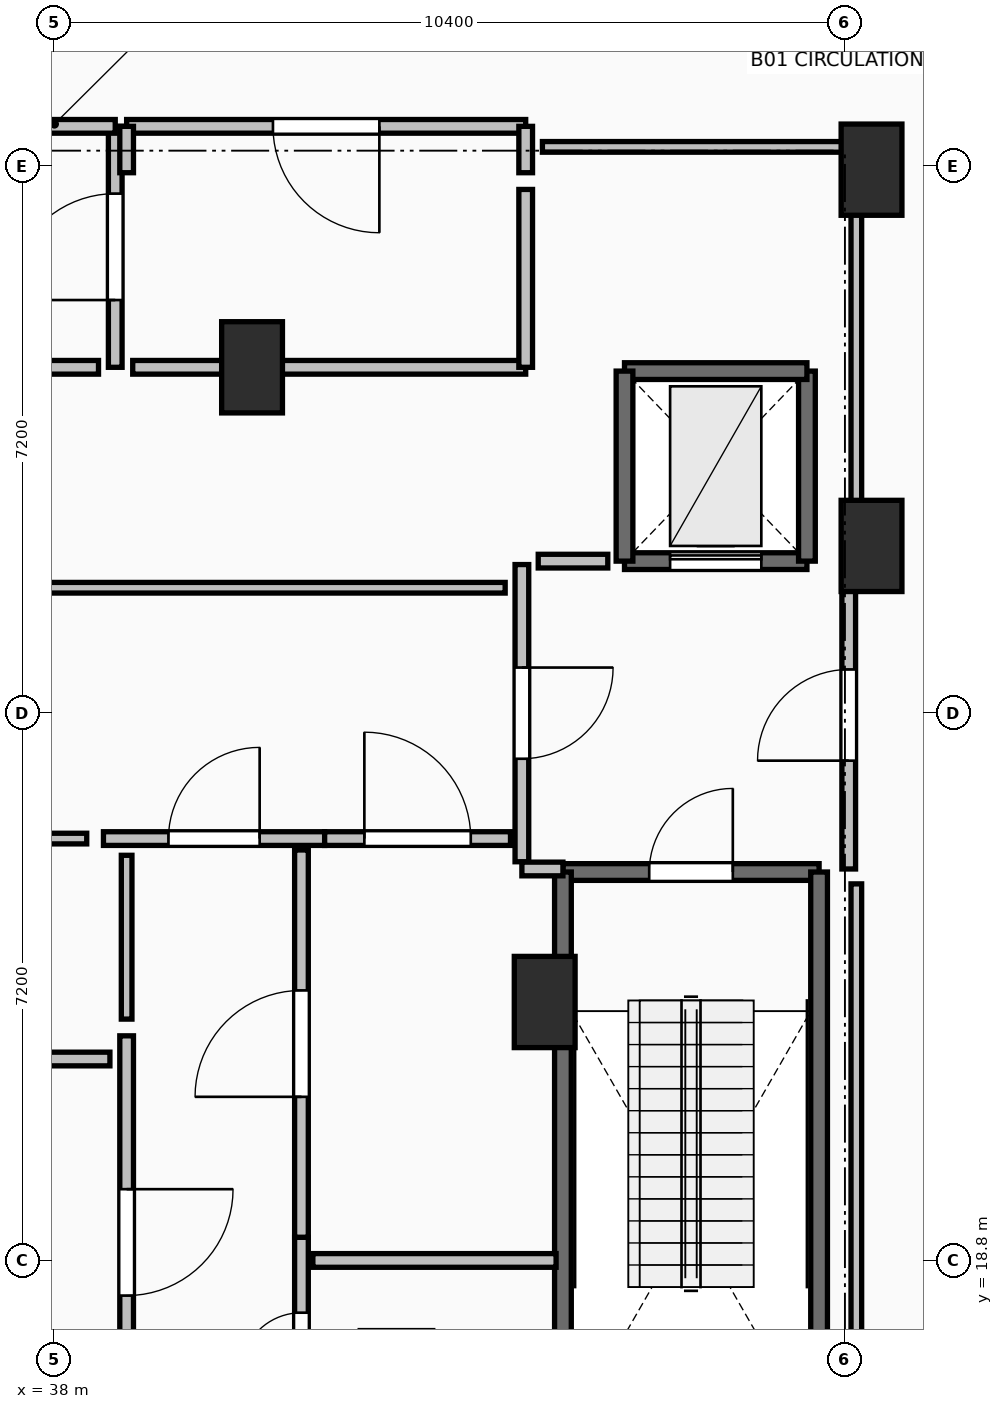
"""IFC4 building model, lengths in metres.
Left out: names, types, materials, properties, quantities, classifications, styles, units other than length and angle.
Written with IfcOpenShell. Run it as: python <this file> out.ifc"""

import sys

from ifc_helpers import new_model, si_unit, direction, frame, frame_2d, origin, origin_2d, place, context, subcontext, project, spatial, rectangle, extrude, element, fill, save


model = new_model("IFC4")
c1 = context("Model", 3, precision=1e-05, world=origin(), true_north=direction((0.0, 1.0)))
c2 = subcontext(c1, "Body", "Model", "MODEL_VIEW")
j1 = project(units=[si_unit("LENGTHUNIT", "METRE"), si_unit("PLANEANGLEUNIT", "RADIAN")], contexts=[c1])
p1 = place(None, origin())
s1 = spatial("IfcSite", under=j1, at=p1, CompositionType="ELEMENT")
p2 = place(p1, origin())
s2 = spatial("IfcBuilding", under=s1, at=p2, CompositionType="ELEMENT")
p3 = place(p2, frame((0.0, 0.0, -4.8)))
s3 = spatial("IfcBuildingStorey", under=s2, at=p3, CompositionType="ELEMENT", Elevation=-4.8)
for number, where, z_axis, x_axis in (
    (1, (48.75, 33.15, 0.0), (0.0, 0.0, 1.0), (1.0, 0.0, 0.0)),
    (2, (48.75, 28.2, 0.0), (0.0, 0.0, 1.0), (1.0, 0.0, 0.0)),
    (3, (44.45, 22.2, 0.0), (0.0, 0.0, 1.0), (1.0, 0.0, 0.0)),
    (4, (40.6, 30.55, 0.0), (0.0, 0.0, 1.0), (1.0, 0.0, 0.0)),
):
    element("IfcColumn", number, at=place(p3, frame(where, z_axis=z_axis, x_axis=x_axis)), inside=s3, PredefinedType="PILASTER", context=c2, shape_type="SweptSolid", body=[
        extrude(rectangle(XDim=0.8, YDim=1.2, at=origin_2d()), origin(), (0.0, 0.0, 1.0), 4.8),
    ])
p4 = place(p3, frame((44.69, 23.91, 0.0), z_axis=(0.0, 0.0, 1.0), x_axis=(1.0, 0.0, 0.0)))
e5 = element("IfcWall", 5, at=p4, inside=s3, PredefinedType="SOLIDWALL", context=c2, shape_type="SweptSolid", body=[
    extrude(rectangle(XDim=3.37, YDim=0.22, at=frame_2d((1.685, 0.0))), origin(), (0.0, 0.0, 1.0), 4.46),
])
p5 = place(p4, frame((1.135, 0.0, 0.0)))
e6 = element("IfcOpeningElement", 6, at=p5, cuts=e5, PredefinedType="OPENING", context=c2, shape_type="SweptSolid", body=[
    extrude(rectangle(XDim=1.1, YDim=2.15, at=frame_2d((0.55, 1.075))), frame((0.0, 0.125, 0.0), z_axis=(0.0, -1.0, 0.0), x_axis=(1.0, 0.0, 0.0)), (0.0, 0.0, 1.0), 0.25),
])
for number, where, z_axis, x_axis in (
    (7, (48.06, 23.91, 0.0), (0.0, 0.0, 1.0), (0.0, -1.0, 0.0)),
    (8, (44.69, 16.49, 0.0), (0.0, 0.0, 1.0), (0.0, 1.0, 0.0)),
):
    element("IfcWall", number, at=place(p3, frame(where, z_axis=z_axis, x_axis=x_axis)), inside=s3, PredefinedType="SOLIDWALL", context=c2, shape_type="SweptSolid", body=[
        extrude(rectangle(XDim=7.42, YDim=0.22, at=frame_2d((3.71, 0.0))), origin(), (0.0, 0.0, 1.0), 4.46),
    ])
p6 = place(p3, frame((45.5, 28.0, 0.0), z_axis=(0.0, 0.0, 1.0), x_axis=(1.0, 0.0, 0.0)))
e9 = element("IfcWall", 9, at=p6, inside=s3, PredefinedType="SHEAR", context=c2, shape_type="SweptSolid", body=[
    extrude(rectangle(XDim=2.4, YDim=0.22, at=frame_2d((1.2, 0.0))), origin(), (0.0, 0.0, 1.0), 4.46),
])
p7 = place(p6, frame((0.6, 0.0, 0.0)))
e10 = element("IfcOpeningElement", 10, at=p7, cuts=e9, PredefinedType="OPENING", context=c2, shape_type="SweptSolid", body=[
    extrude(rectangle(XDim=1.2, YDim=2.2, at=frame_2d((0.6, 1.1))), frame((0.0, 0.125, 0.0), z_axis=(0.0, -1.0, 0.0), x_axis=(1.0, 0.0, 0.0)), (0.0, 0.0, 1.0), 0.25),
])
p8 = place(p3, frame((47.9, 28.0, 0.0), z_axis=(0.0, 0.0, 1.0), x_axis=(0.0, 1.0, 0.0)))
e11 = element("IfcWall", 11, at=p8, inside=s3, PredefinedType="SHEAR", context=c2, shape_type="SweptSolid", body=[
    extrude(rectangle(XDim=2.5, YDim=0.22, at=frame_2d((1.25, 0.0))), origin(), (0.0, 0.0, 1.0), 4.46),
])
p9 = place(p3, frame((47.9, 30.5, 0.0), z_axis=(0.0, 0.0, 1.0), x_axis=(-1.0, 0.0, 0.0)))
e12 = element("IfcWall", 12, at=p9, inside=s3, PredefinedType="SHEAR", context=c2, shape_type="SweptSolid", body=[
    extrude(rectangle(XDim=2.4, YDim=0.22, at=frame_2d((1.2, 0.0))), origin(), (0.0, 0.0, 1.0), 4.46),
])
p10 = place(p3, frame((45.5, 30.5, 0.0), z_axis=(0.0, 0.0, 1.0), x_axis=(0.0, -1.0, 0.0)))
e13 = element("IfcWall", 13, at=p10, inside=s3, PredefinedType="SHEAR", context=c2, shape_type="SweptSolid", body=[
    extrude(rectangle(XDim=2.5, YDim=0.22, at=frame_2d((1.25, 0.0))), origin(), (0.0, 0.0, 1.0), 4.46),
])
p11 = place(p3, frame((44.15, 27.955, 0.0), z_axis=(0.0, 0.0, 1.0), x_axis=(0.0, -1.0, 0.0)))
e14 = element("IfcWall", 14, at=p11, inside=s3, PredefinedType="PARTITIONING", context=c2, shape_type="SweptSolid", body=[
    extrude(rectangle(XDim=3.91, YDim=0.18, at=frame_2d((1.955, 0.0))), origin(), (0.0, 0.0, 1.0), 4.46),
])
p12 = place(p11, frame((1.355, 0.0, 0.0)))
e15 = element("IfcOpeningElement", 15, at=p12, cuts=e14, PredefinedType="OPENING", context=c2, shape_type="SweptSolid", body=[
    extrude(rectangle(XDim=1.2, YDim=2.15, at=frame_2d((0.6, 1.075))), frame((0.0, 0.105, 0.0), z_axis=(0.0, -1.0, 0.0), x_axis=(1.0, 0.0, 0.0)), (0.0, 0.0, 1.0), 0.21),
])
p13 = place(p3, frame((44.15, 23.95, 0.0), z_axis=(0.0, 0.0, 1.0), x_axis=(1.0, 0.0, 0.0)))
e16 = element("IfcWall", 16, at=p13, inside=s3, PredefinedType="PARTITIONING", context=c2, shape_type="SweptSolid", body=[
    extrude(rectangle(XDim=0.54, YDim=0.18, at=frame_2d((0.27, 0.0))), origin(), (0.0, 0.0, 1.0), 4.46),
])
p14 = place(p3, frame((48.45, 23.95, 0.0), z_axis=(0.0, 0.0, 1.0), x_axis=(0.0, 1.0, 0.0)))
e17 = element("IfcWall", 17, at=p14, inside=s3, PredefinedType="PARTITIONING", context=c2, shape_type="SweptSolid", body=[
    extrude(rectangle(XDim=4.05, YDim=0.18, at=frame_2d((2.025, 0.0))), origin(), (0.0, 0.0, 1.0), 3.04),
])
p15 = place(p14, frame((1.425, 0.0, 0.0)))
e18 = element("IfcOpeningElement", 18, at=p15, cuts=e17, PredefinedType="OPENING", context=c2, shape_type="SweptSolid", body=[
    extrude(rectangle(XDim=1.2, YDim=2.15, at=frame_2d((0.6, 1.075))), frame((0.0, 0.105, 0.0), z_axis=(0.0, -1.0, 0.0), x_axis=(1.0, 0.0, 0.0)), (0.0, 0.0, 1.0), 0.21),
])
p16 = place(p3, frame((38.645, 24.35, 0.0), z_axis=(0.0, 0.0, 1.0), x_axis=(1.0, 0.0, 0.0)))
e19 = element("IfcWall", 19, at=p16, inside=s3, PredefinedType="PARTITIONING", context=c2, shape_type="SweptSolid", body=[
    extrude(rectangle(XDim=2.91, YDim=0.18, at=frame_2d((1.455, 0.0))), origin(), (0.0, 0.0, 1.0), 4.46),
])
p17 = place(p16, frame((0.855, 0.0, 0.0)))
e20 = element("IfcOpeningElement", 20, at=p17, cuts=e19, PredefinedType="OPENING", context=c2, shape_type="SweptSolid", body=[
    extrude(rectangle(XDim=1.2, YDim=2.15, at=frame_2d((0.6, 1.075))), frame((0.0, 0.105, 0.0), z_axis=(0.0, -1.0, 0.0), x_axis=(1.0, 0.0, 0.0)), (0.0, 0.0, 1.0), 0.21),
])
p18 = place(p3, frame((41.555, 24.35, 0.0), z_axis=(0.0, 0.0, 1.0), x_axis=(1.0, 0.0, 0.0)))
e21 = element("IfcWall", 21, at=p18, inside=s3, PredefinedType="PARTITIONING", context=c2, shape_type="SweptSolid", body=[
    extrude(rectangle(XDim=2.445, YDim=0.18, at=frame_2d((1.223, 0.0))), origin(), (0.0, 0.0, 1.0), 4.46),
])
p19 = place(p18, frame((0.522, 0.0, 0.0)))
e22 = element("IfcOpeningElement", 22, at=p19, cuts=e21, PredefinedType="OPENING", context=c2, shape_type="SweptSolid", body=[
    extrude(rectangle(XDim=1.4, YDim=2.2, at=frame_2d((0.7, 1.1))), frame((0.0, 0.105, 0.0), z_axis=(0.0, -1.0, 0.0), x_axis=(1.0, 0.0, 0.0)), (0.0, 0.0, 1.0), 0.21),
])
p20 = place(p3, frame((38.95, 21.755, 0.0), z_axis=(0.0, 0.0, 1.0), x_axis=(0.0, -1.0, 0.0)))
e23 = element("IfcWall", 23, at=p20, inside=s3, PredefinedType="PARTITIONING", context=c2, shape_type="SweptSolid", body=[
    extrude(rectangle(XDim=5.435, YDim=0.18, at=frame_2d((2.717, 0.0))), origin(), (0.0, 0.0, 1.0), 4.46),
])
p21 = place(p20, frame((2.018, 0.0, 0.0)))
e24 = element("IfcOpeningElement", 24, at=p21, cuts=e23, PredefinedType="OPENING", context=c2, shape_type="SweptSolid", body=[
    extrude(rectangle(XDim=1.4, YDim=2.2, at=frame_2d((0.7, 1.1))), frame((0.0, 0.105, 0.0), z_axis=(0.0, -1.0, 0.0), x_axis=(1.0, 0.0, 0.0)), (0.0, 0.0, 1.0), 0.21),
])
p22 = place(p3, frame((41.25, 16.32, 0.0), z_axis=(0.0, 0.0, 1.0), x_axis=(0.0, 1.0, 0.0)))
e25 = element("IfcWall", 25, at=p22, inside=s3, PredefinedType="PARTITIONING", context=c2, shape_type="SweptSolid", body=[
    extrude(rectangle(XDim=2.785, YDim=0.18, at=frame_2d((1.393, 0.0))), origin(), (0.0, 0.0, 1.0), 4.46),
])
p23 = place(p22, frame((0.992, 0.0, 0.0)))
e26 = element("IfcOpeningElement", 26, at=p23, cuts=e25, PredefinedType="OPENING", context=c2, shape_type="SweptSolid", body=[
    extrude(rectangle(XDim=0.8, YDim=2.05, at=frame_2d((0.4, 1.025))), frame((0.0, 0.105, 0.0), z_axis=(0.0, -1.0, 0.0), x_axis=(1.0, 0.0, 0.0)), (0.0, 0.0, 1.0), 0.21),
])
p24 = place(p3, frame((41.25, 19.105, 0.0), z_axis=(0.0, 0.0, 1.0), x_axis=(0.0, 1.0, 0.0)))
e27 = element("IfcWall", 27, at=p24, inside=s3, PredefinedType="PARTITIONING", context=c2, shape_type="SweptSolid", body=[
    extrude(rectangle(XDim=5.095, YDim=0.18, at=frame_2d((2.547, 0.0))), origin(), (0.0, 0.0, 1.0), 4.46),
])
p25 = place(p24, frame((1.847, 0.0, 0.0)))
e28 = element("IfcOpeningElement", 28, at=p25, cuts=e27, PredefinedType="OPENING", context=c2, shape_type="SweptSolid", body=[
    extrude(rectangle(XDim=1.4, YDim=2.2, at=frame_2d((0.7, 1.1))), frame((0.0, 0.105, 0.0), z_axis=(0.0, -1.0, 0.0), x_axis=(1.0, 0.0, 0.0)), (0.0, 0.0, 1.0), 0.21),
])
p26 = place(p3, frame((38.8, 30.55, 0.0), z_axis=(0.0, 0.0, 1.0), x_axis=(0.0, 1.0, 0.0)))
e29 = element("IfcWall", 29, at=p26, inside=s3, PredefinedType="PARTITIONING", context=c2, shape_type="SweptSolid", body=[
    extrude(rectangle(XDim=3.17, YDim=0.18, at=frame_2d((1.585, 0.0))), origin(), (0.0, 0.0, 1.0), 3.04),
])
p27 = place(p26, frame((0.885, 0.0, 0.0)))
e30 = element("IfcOpeningElement", 30, at=p27, cuts=e29, PredefinedType="OPENING", context=c2, shape_type="SweptSolid", body=[
    extrude(rectangle(XDim=1.4, YDim=2.2, at=frame_2d((0.7, 1.1))), frame((0.0, 0.105, 0.0), z_axis=(0.0, -1.0, 0.0), x_axis=(1.0, 0.0, 0.0)), (0.0, 0.0, 1.0), 0.21),
])
p28 = place(p3, frame((38.8, 33.72, 0.0), z_axis=(0.0, 0.0, 1.0), x_axis=(-1.0, 0.0, 0.0)))
e31 = element("IfcWall", 31, at=p28, inside=s3, PredefinedType="PARTITIONING", context=c2, shape_type="SweptSolid", body=[
    extrude(rectangle(XDim=5.2, YDim=0.18, at=frame_2d((2.6, 0.0))), origin(), (0.0, 0.0, 1.0), 4.46),
])
p29 = place(p28, frame((1.9, 0.0, 0.0)))
e32 = element("IfcOpeningElement", 32, at=p29, cuts=e31, PredefinedType="OPENING", context=c2, shape_type="SweptSolid", body=[
    extrude(rectangle(XDim=1.4, YDim=2.2, at=frame_2d((0.7, 1.1))), frame((0.0, 0.105, 0.0), z_axis=(0.0, -1.0, 0.0), x_axis=(1.0, 0.0, 0.0)), (0.0, 0.0, 1.0), 0.21),
])
p30 = place(p3, frame((44.2, 33.72, 0.0), z_axis=(0.0, 0.0, 1.0), x_axis=(-1.0, 0.0, 0.0)))
e33 = element("IfcWall", 33, at=p30, inside=s3, PredefinedType="PARTITIONING", context=c2, shape_type="SweptSolid", body=[
    extrude(rectangle(XDim=5.25, YDim=0.18, at=frame_2d((2.625, 0.0))), origin(), (0.0, 0.0, 1.0), 4.46),
])
p31 = place(p30, frame((1.925, 0.0, 0.0)))
e34 = element("IfcOpeningElement", 34, at=p31, cuts=e33, PredefinedType="OPENING", context=c2, shape_type="SweptSolid", body=[
    extrude(rectangle(XDim=1.4, YDim=2.2, at=frame_2d((0.7, 1.1))), frame((0.0, 0.105, 0.0), z_axis=(0.0, -1.0, 0.0), x_axis=(1.0, 0.0, 0.0)), (0.0, 0.0, 1.0), 0.21),
])
for number, where, z_axis, x_axis in (
    (35, (38.95, 33.72, 0.0), (0.0, 0.0, 1.0), (0.0, -1.0, 0.0)),
    (36, (44.2, 33.11, 0.0), (0.0, 0.0, 1.0), (0.0, 1.0, 0.0)),
):
    element("IfcWall", number, at=place(p3, frame(where, z_axis=z_axis, x_axis=x_axis)), inside=s3, PredefinedType="PARTITIONING", context=c2, shape_type="SweptSolid", body=[
        extrude(rectangle(XDim=0.61, YDim=0.18, at=frame_2d((0.305, 0.0))), origin(), (0.0, 0.0, 1.0), 4.46),
    ])
p32 = place(p3, frame((44.6, 18.8, 0.0), z_axis=(0.0, 0.0, 1.0), x_axis=(-1.0, 0.0, 0.0)))
e37 = element("IfcWall", 37, at=p32, inside=s3, PredefinedType="PARTITIONING", context=c2, shape_type="SweptSolid", body=[
    extrude(rectangle(XDim=3.2, YDim=0.18, at=frame_2d((1.6, 0.0))), origin(), (0.0, 0.0, 1.0), 4.46),
])
p33 = place(p3, frame((45.28, 28.0, 0.0), z_axis=(0.0, 0.0, 1.0), x_axis=(-1.0, 0.0, 0.0)))
e38 = element("IfcWall", 38, at=p33, inside=s3, PredefinedType="PARTITIONING", context=c2, shape_type="SweptSolid", body=[
    extrude(rectangle(XDim=0.915, YDim=0.18, at=frame_2d((0.458, 0.0))), origin(), (0.0, 0.0, 1.0), 4.46),
])
p34 = place(p3, frame((43.93, 27.65, 0.0), z_axis=(0.0, 0.0, 1.0), x_axis=(-1.0, 0.0, 0.0)))
e39 = element("IfcWall", 39, at=p34, inside=s3, PredefinedType="PARTITIONING", context=c2, shape_type="SweptSolid", body=[
    extrude(rectangle(XDim=11.86, YDim=0.14, at=frame_2d((5.93, 0.0))), origin(), (0.0, 0.0, 1.0), 4.46),
])
p35 = place(p3, frame((32.07, 24.35, 0.0), z_axis=(0.0, 0.0, 1.0), x_axis=(1.0, 0.0, 0.0)))
e40 = element("IfcWall", 40, at=p35, inside=s3, PredefinedType="PARTITIONING", context=c2, shape_type="SweptSolid", body=[
    extrude(rectangle(XDim=6.355, YDim=0.14, at=frame_2d((3.177, 0.0))), origin(), (0.0, 0.0, 1.0), 4.46),
])
p36 = place(p3, frame((38.95, 24.13, 0.0), z_axis=(0.0, 0.0, 1.0), x_axis=(0.0, -1.0, 0.0)))
e41 = element("IfcWall", 41, at=p36, inside=s3, PredefinedType="PARTITIONING", context=c2, shape_type="SweptSolid", body=[
    extrude(rectangle(XDim=2.155, YDim=0.14, at=frame_2d((1.077, 0.0))), origin(), (0.0, 0.0, 1.0), 4.46),
])
p37 = place(p3, frame((33.694, 30.55, 0.0), z_axis=(0.0, 0.0, 1.0), x_axis=(1.0, 0.0, 0.0)))
e42 = element("IfcWall", 42, at=p37, inside=s3, PredefinedType="PARTITIONING", context=c2, shape_type="SweptSolid", body=[
    extrude(rectangle(XDim=4.886, YDim=0.18, at=frame_2d((2.443, 0.0))), origin(), (0.0, 0.0, 1.0), 3.04),
])
p38 = place(p3, frame((39.03, 30.55, 0.0), z_axis=(0.0, 0.0, 1.0), x_axis=(1.0, 0.0, 0.0)))
e43 = element("IfcWall", 43, at=p38, inside=s3, PredefinedType="PARTITIONING", context=c2, shape_type="SweptSolid", body=[
    extrude(rectangle(XDim=5.17, YDim=0.18, at=frame_2d((2.585, 0.0))), origin(), (0.0, 0.0, 1.0), 3.04),
])
p39 = place(p3, frame((44.2, 30.55, 0.0), z_axis=(0.0, 0.0, 1.0), x_axis=(0.0, 1.0, 0.0)))
e44 = element("IfcWall", 44, at=p39, inside=s3, PredefinedType="PARTITIONING", context=c2, shape_type="SweptSolid", body=[
    extrude(rectangle(XDim=2.34, YDim=0.18, at=frame_2d((1.17, 0.0))), origin(), (0.0, 0.0, 1.0), 4.46),
])
p40 = place(p3, frame((38.73, 21.45, 0.0), z_axis=(0.0, 0.0, 1.0), x_axis=(-1.0, 0.0, 0.0)))
e45 = element("IfcWall", 45, at=p40, inside=s3, PredefinedType="PARTITIONING", context=c2, shape_type="SweptSolid", body=[
    extrude(rectangle(XDim=7.2, YDim=0.18, at=frame_2d((3.6, 0.0))), origin(), (0.0, 0.0, 1.0), 4.46),
])
p41 = place(p3, frame((44.42, 33.45, 0.0), z_axis=(0.0, 0.0, 1.0), x_axis=(1.0, 0.0, 0.0)))
e46 = element("IfcWall", 46, at=p41, inside=s3, PredefinedType="PARTITIONING", context=c2, shape_type="SweptSolid", body=[
    extrude(rectangle(XDim=4.13, YDim=0.14, at=frame_2d((2.065, 0.0))), origin(), (0.0, 0.0, 1.0), 4.46),
])
p42 = place(p3, frame((48.55, 33.45, 0.0), z_axis=(0.0, 0.0, 1.0), x_axis=(0.0, -1.0, 0.0)))
e47 = element("IfcWall", 47, at=p42, inside=s3, PredefinedType="PARTITIONING", context=c2, shape_type="SweptSolid", body=[
    extrude(rectangle(XDim=5.254, YDim=0.14, at=frame_2d((2.627, 0.0))), origin(), (0.0, 0.0, 1.0), 3.04),
])
p43 = place(p3, frame((48.55, 23.754, 0.0), z_axis=(0.0, 0.0, 1.0), x_axis=(0.0, -1.0, 0.0)))
e48 = element("IfcWall", 48, at=p43, inside=s3, PredefinedType="PARTITIONING", context=c2, shape_type="SweptSolid", body=[
    extrude(rectangle(XDim=7.514, YDim=0.14, at=frame_2d((3.757, 0.0))), origin(), (0.0, 0.0, 1.0), 3.04),
])
p44 = place(p5, origin())
e49 = element("IfcDoor", 49, at=p44, inside=s3, OperationType="SINGLE_SWING_RIGHT", PredefinedType="DOOR", context=c2, shape_type="SweptSolid", body=[
    extrude(rectangle(XDim=1.1, YDim=2.15, at=frame_2d((0.55, 1.075))), frame((0.0, 0.025, 0.0), z_axis=(0.0, -1.0, 0.0), x_axis=(1.0, 0.0, 0.0)), (0.0, 0.0, 1.0), 0.05),
])
fill(e6, e49)
p45 = place(p7, origin())
e50 = element("IfcDoor", 50, at=p45, inside=s3, OperationType="SLIDING_TO_LEFT", PredefinedType="DOOR", context=c2, shape_type="SweptSolid", body=[
    extrude(rectangle(XDim=1.2, YDim=2.2, at=frame_2d((0.6, 1.1))), frame((0.0, 0.025, 0.0), z_axis=(0.0, -1.0, 0.0), x_axis=(1.0, 0.0, 0.0)), (0.0, 0.0, 1.0), 0.05),
])
fill(e10, e50)
p46 = place(p12, origin())
e51 = element("IfcDoor", 51, at=p46, inside=s3, OperationType="SINGLE_SWING_LEFT", PredefinedType="DOOR", context=c2, shape_type="SweptSolid", body=[
    extrude(rectangle(XDim=1.2, YDim=2.15, at=frame_2d((0.6, 1.075))), frame((0.0, 0.025, 0.0), z_axis=(0.0, -1.0, 0.0), x_axis=(1.0, 0.0, 0.0)), (0.0, 0.0, 1.0), 0.05),
])
fill(e15, e51)
p47 = place(p15, origin())
e52 = element("IfcDoor", 52, at=p47, inside=s3, OperationType="SINGLE_SWING_LEFT", PredefinedType="DOOR", context=c2, shape_type="SweptSolid", body=[
    extrude(rectangle(XDim=1.2, YDim=2.15, at=frame_2d((0.6, 1.075))), frame((0.0, 0.025, 0.0), z_axis=(0.0, -1.0, 0.0), x_axis=(1.0, 0.0, 0.0)), (0.0, 0.0, 1.0), 0.05),
])
fill(e18, e52)
p48 = place(p17, origin())
e53 = element("IfcDoor", 53, at=p48, inside=s3, OperationType="SINGLE_SWING_RIGHT", PredefinedType="DOOR", context=c2, shape_type="SweptSolid", body=[
    extrude(rectangle(XDim=1.2, YDim=2.15, at=frame_2d((0.6, 1.075))), frame((0.0, 0.025, 0.0), z_axis=(0.0, -1.0, 0.0), x_axis=(1.0, 0.0, 0.0)), (0.0, 0.0, 1.0), 0.05),
])
fill(e20, e53)
p49 = place(p19, origin())
e54 = element("IfcDoor", 54, at=p49, inside=s3, OperationType="DOUBLE_SWING_LEFT", PredefinedType="DOOR", context=c2, shape_type="SweptSolid", body=[
    extrude(rectangle(XDim=1.4, YDim=2.2, at=frame_2d((0.7, 1.1))), frame((0.0, 0.025, 0.0), z_axis=(0.0, -1.0, 0.0), x_axis=(1.0, 0.0, 0.0)), (0.0, 0.0, 1.0), 0.05),
])
fill(e22, e54)
p50 = place(p21, origin())
e55 = element("IfcDoor", 55, at=p50, inside=s3, OperationType="DOUBLE_SWING_LEFT", PredefinedType="DOOR", context=c2, shape_type="SweptSolid", body=[
    extrude(rectangle(XDim=1.4, YDim=2.2, at=frame_2d((0.7, 1.1))), frame((0.0, 0.025, 0.0), z_axis=(0.0, -1.0, 0.0), x_axis=(1.0, 0.0, 0.0)), (0.0, 0.0, 1.0), 0.05),
])
fill(e24, e55)
p51 = place(p23, origin())
e56 = element("IfcDoor", 56, at=p51, inside=s3, OperationType="SINGLE_SWING_LEFT", PredefinedType="DOOR", context=c2, shape_type="SweptSolid", body=[
    extrude(rectangle(XDim=0.8, YDim=2.05, at=frame_2d((0.4, 1.025))), frame((0.0, 0.025, 0.0), z_axis=(0.0, -1.0, 0.0), x_axis=(1.0, 0.0, 0.0)), (0.0, 0.0, 1.0), 0.05),
])
fill(e26, e56)
p52 = place(p25, origin())
e57 = element("IfcDoor", 57, at=p52, inside=s3, OperationType="DOUBLE_SWING_LEFT", PredefinedType="DOOR", context=c2, shape_type="SweptSolid", body=[
    extrude(rectangle(XDim=1.4, YDim=2.2, at=frame_2d((0.7, 1.1))), frame((0.0, 0.025, 0.0), z_axis=(0.0, -1.0, 0.0), x_axis=(1.0, 0.0, 0.0)), (0.0, 0.0, 1.0), 0.05),
])
fill(e28, e57)
p53 = place(p27, origin())
e58 = element("IfcDoor", 58, at=p53, inside=s3, OperationType="DOUBLE_SWING_LEFT", PredefinedType="DOOR", context=c2, shape_type="SweptSolid", body=[
    extrude(rectangle(XDim=1.4, YDim=2.2, at=frame_2d((0.7, 1.1))), frame((0.0, 0.025, 0.0), z_axis=(0.0, -1.0, 0.0), x_axis=(1.0, 0.0, 0.0)), (0.0, 0.0, 1.0), 0.05),
])
fill(e30, e58)
p54 = place(p31, origin())
e59 = element("IfcDoor", 59, at=p54, inside=s3, OperationType="DOUBLE_SWING_LEFT", PredefinedType="DOOR", context=c2, shape_type="SweptSolid", body=[
    extrude(rectangle(XDim=1.4, YDim=2.2, at=frame_2d((0.7, 1.1))), frame((0.0, 0.025, 0.0), z_axis=(0.0, -1.0, 0.0), x_axis=(1.0, 0.0, 0.0)), (0.0, 0.0, 1.0), 0.05),
])
fill(e34, e59)
save(model, sys.argv[1])
